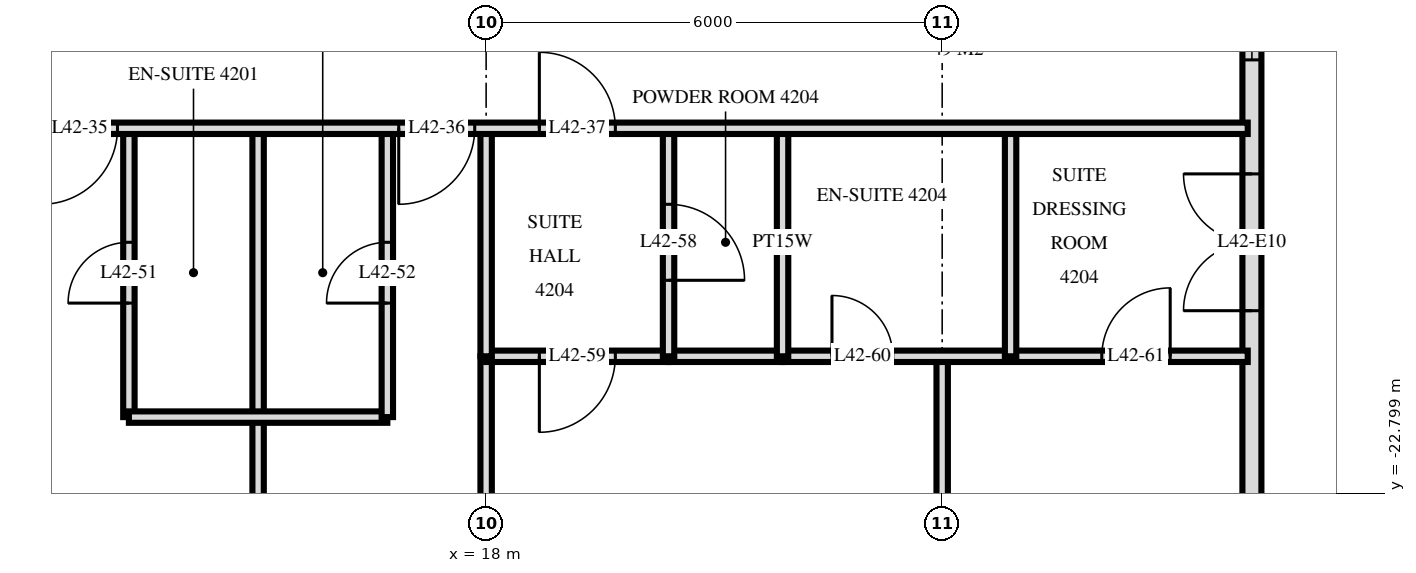
"""IFC4 building model, lengths in metres.
Left out: names, types, materials, properties, quantities, classifications, styles, units other than length and angle.
Written with IfcOpenShell. Run it as: python <this file> out.ifc"""

import sys

from ifc_helpers import new_model, si_unit, direction, frame, frame_2d, origin, place, context, subcontext, project, spatial, rectangle, extrude, element, fill, save


model = new_model("IFC4")
c1 = context("Model", 3, precision=1e-05, world=origin(), true_north=direction((0.0, 1.0)))
c2 = subcontext(c1, "Body", "Model", "MODEL_VIEW")
j1 = project(units=[si_unit("LENGTHUNIT", "METRE"), si_unit("PLANEANGLEUNIT", "RADIAN")], contexts=[c1])
p1 = place(None, origin())
s1 = spatial("IfcSite", under=j1, at=p1, CompositionType="ELEMENT")
p2 = place(p1, origin())
s2 = spatial("IfcBuilding", under=s1, at=p2, CompositionType="ELEMENT")
p3 = place(p2, frame((0.0, 0.0, 163.2)))
s3 = spatial("IfcBuildingStorey", under=s2, at=p3, CompositionType="ELEMENT", Elevation=163.2)
p4 = place(p3, frame((28.075, -29.275, 0.0), z_axis=(0.0, 0.0, 1.0), x_axis=(0.0, 1.0, 0.0)))
e1 = element("IfcWall", 1, at=p4, inside=s3, PredefinedType="SOLIDWALL", context=c2, shape_type="SweptSolid", body=[
    extrude(rectangle(XDim=25.951, YDim=0.25, at=frame_2d((12.975, 0.0))), origin(), (0.0, 0.0, 1.0), 3.32),
])
p5 = place(p4, frame((0.575, 0.0, 0.0)))
e2 = element("IfcOpeningElement", 2, at=p5, cuts=e1, PredefinedType="OPENING", context=c2, shape_type="SweptSolid", body=[
    extrude(rectangle(XDim=1.8, YDim=2.4, at=frame_2d((0.9, 1.2))), frame((0.0, 0.135, 0.0), z_axis=(0.0, -1.0, 0.0), x_axis=(1.0, 0.0, 0.0)), (0.0, 0.0, 1.0), 0.27),
])
p6 = place(p4, frame((3.325, 0.0, 0.3)))
e3 = element("IfcOpeningElement", 3, at=p6, cuts=e1, PredefinedType="OPENING", context=c2, shape_type="SweptSolid", body=[
    extrude(rectangle(XDim=1.8, YDim=2.1, at=frame_2d((0.9, 1.05))), frame((0.0, 0.135, 0.0), z_axis=(0.0, -1.0, 0.0), x_axis=(1.0, 0.0, 0.0)), (0.0, 0.0, 1.0), 0.27),
])
p7 = place(p4, frame((8.875, 0.0, 0.0)))
e4 = element("IfcOpeningElement", 4, at=p7, cuts=e1, PredefinedType="OPENING", context=c2, shape_type="SweptSolid", body=[
    extrude(rectangle(XDim=1.8, YDim=2.4, at=frame_2d((0.9, 1.2))), frame((0.0, 0.135, 0.0), z_axis=(0.0, -1.0, 0.0), x_axis=(1.0, 0.0, 0.0)), (0.0, 0.0, 1.0), 0.27),
])
p8 = place(p4, frame((12.175, 0.0, 0.3)))
e5 = element("IfcOpeningElement", 5, at=p8, cuts=e1, PredefinedType="OPENING", context=c2, shape_type="SweptSolid", body=[
    extrude(rectangle(XDim=1.2, YDim=2.1, at=frame_2d((0.6, 1.05))), frame((0.0, 0.135, 0.0), z_axis=(0.0, -1.0, 0.0), x_axis=(1.0, 0.0, 0.0)), (0.0, 0.0, 1.0), 0.27),
])
p9 = place(p4, frame((17.5, 0.0, 0.0)))
e6 = element("IfcOpeningElement", 6, at=p9, cuts=e1, PredefinedType="OPENING", context=c2, shape_type="SweptSolid", body=[
    extrude(rectangle(XDim=1.8, YDim=2.4, at=frame_2d((0.9, 1.2))), frame((0.0, 0.135, 0.0), z_axis=(0.0, -1.0, 0.0), x_axis=(1.0, 0.0, 0.0)), (0.0, 0.0, 1.0), 0.27),
])
p10 = place(p3, frame((24.9, -21.0, 0.0), z_axis=(0.0, 0.0, 1.0), x_axis=(0.0, 1.0, 0.0)))
e7 = element("IfcWall", 7, at=p10, inside=s3, PredefinedType="PARTITIONING", context=c2, shape_type="SweptSolid", body=[
    extrude(rectangle(XDim=3.0, YDim=0.15, at=frame_2d((1.5, 0.0))), origin(), (0.0, 0.0, 1.0), 3.32),
])
p11 = place(p3, frame((24.0, -33.557, 0.0), z_axis=(0.0, 0.0, 1.0), x_axis=(0.0, 1.0, 0.0)))
e8 = element("IfcWall", 8, at=p11, inside=s3, PredefinedType="PARTITIONING", context=c2, shape_type="SweptSolid", body=[
    extrude(rectangle(XDim=12.557, YDim=0.15, at=frame_2d((6.278, 0.0))), origin(), (0.0, 0.0, 1.0), 3.32),
])
p12 = place(p11, frame((5.737, 0.0, 0.0)))
e9 = element("IfcOpeningElement", 9, at=p12, cuts=e8, PredefinedType="OPENING", context=c2, shape_type="SweptSolid", body=[
    extrude(rectangle(XDim=0.9, YDim=2.1, at=frame_2d((0.45, 1.05))), frame((0.0, 0.085, 0.0), z_axis=(0.0, -1.0, 0.0), x_axis=(1.0, 0.0, 0.0)), (0.0, 0.0, 1.0), 0.17),
])
p13 = place(p3, frame((21.9, -21.0, 0.0), z_axis=(0.0, 0.0, 1.0), x_axis=(0.0, 1.0, 0.0)))
e10 = element("IfcWall", 10, at=p13, inside=s3, PredefinedType="PLUMBINGWALL", context=c2, shape_type="SweptSolid", body=[
    extrude(rectangle(XDim=3.0, YDim=0.15, at=frame_2d((1.5, 0.0))), origin(), (0.0, 0.0, 1.0), 3.32),
])
p14 = place(p3, frame((20.4, -21.0, 0.0), z_axis=(0.0, 0.0, 1.0), x_axis=(0.0, 1.0, 0.0)))
e11 = element("IfcWall", 11, at=p14, inside=s3, PredefinedType="PARTITIONING", context=c2, shape_type="SweptSolid", body=[
    extrude(rectangle(XDim=3.0, YDim=0.15, at=frame_2d((1.5, 0.0))), origin(), (0.0, 0.0, 1.0), 3.32),
])
p15 = place(p14, frame((1.0, 0.0, 0.0)))
e12 = element("IfcOpeningElement", 12, at=p15, cuts=e11, PredefinedType="OPENING", context=c2, shape_type="SweptSolid", body=[
    extrude(rectangle(XDim=1.0, YDim=2.1, at=frame_2d((0.5, 1.05))), frame((0.0, 0.085, 0.0), z_axis=(0.0, -1.0, 0.0), x_axis=(1.0, 0.0, 0.0)), (0.0, 0.0, 1.0), 0.17),
])
p16 = place(p3, frame((18.0, -21.0, 0.0), z_axis=(0.0, 0.0, 1.0), x_axis=(0.0, 1.0, 0.0)))
e13 = element("IfcWall", 13, at=p16, inside=s3, PredefinedType="PARTITIONING", context=c2, shape_type="SweptSolid", body=[
    extrude(rectangle(XDim=3.0, YDim=0.15, at=frame_2d((1.5, 0.0))), origin(), (0.0, 0.0, 1.0), 3.32),
])
p17 = place(p3, frame((18.0, -33.62, 0.0), z_axis=(0.0, 0.0, 1.0), x_axis=(0.0, 1.0, 0.0)))
e14 = element("IfcWall", 14, at=p17, inside=s3, PredefinedType="PARTITIONING", context=c2, shape_type="SweptSolid", body=[
    extrude(rectangle(XDim=12.62, YDim=0.15, at=frame_2d((6.31, 0.0))), origin(), (0.0, 0.0, 1.0), 3.32),
])
p18 = place(p3, frame((16.7, -21.8, 0.0), z_axis=(0.0, 0.0, 1.0), x_axis=(0.0, 1.0, 0.0)))
e15 = element("IfcWall", 15, at=p18, inside=s3, PredefinedType="PARTITIONING", context=c2, shape_type="SweptSolid", body=[
    extrude(rectangle(XDim=3.8, YDim=0.15, at=frame_2d((1.9, 0.0))), origin(), (0.0, 0.0, 1.0), 3.32),
])
p19 = place(p18, frame((1.5, 0.0, 0.0)))
e16 = element("IfcOpeningElement", 16, at=p19, cuts=e15, PredefinedType="OPENING", context=c2, shape_type="SweptSolid", body=[
    extrude(rectangle(XDim=0.8, YDim=2.1, at=frame_2d((0.4, 1.05))), frame((0.0, 0.085, 0.0), z_axis=(0.0, -1.0, 0.0), x_axis=(1.0, 0.0, 0.0)), (0.0, 0.0, 1.0), 0.17),
])
p20 = place(p3, frame((15.0, -33.62, 0.0), z_axis=(0.0, 0.0, 1.0), x_axis=(0.0, 1.0, 0.0)))
e17 = element("IfcWall", 17, at=p20, inside=s3, PredefinedType="PARTITIONING", context=c2, shape_type="SweptSolid", body=[
    extrude(rectangle(XDim=15.62, YDim=0.15, at=frame_2d((7.81, 0.0))), origin(), (0.0, 0.0, 1.0), 3.32),
])
p21 = place(p3, frame((13.3, -21.8, 0.0), z_axis=(0.0, 0.0, 1.0), x_axis=(0.0, 1.0, 0.0)))
e18 = element("IfcWall", 18, at=p21, inside=s3, PredefinedType="PARTITIONING", context=c2, shape_type="SweptSolid", body=[
    extrude(rectangle(XDim=3.8, YDim=0.15, at=frame_2d((1.9, 0.0))), origin(), (0.0, 0.0, 1.0), 3.32),
])
p22 = place(p21, frame((1.5, 0.0, 0.0)))
e19 = element("IfcOpeningElement", 19, at=p22, cuts=e18, PredefinedType="OPENING", context=c2, shape_type="SweptSolid", body=[
    extrude(rectangle(XDim=0.8, YDim=2.1, at=frame_2d((0.4, 1.05))), frame((0.0, 0.085, 0.0), z_axis=(0.0, -1.0, 0.0), x_axis=(1.0, 0.0, 0.0)), (0.0, 0.0, 1.0), 0.17),
])
p23 = place(p3, frame((13.3, -21.8, 0.0), z_axis=(0.0, 0.0, 1.0), x_axis=(1.0, 0.0, 0.0)))
e20 = element("IfcWall", 20, at=p23, inside=s3, PredefinedType="PARTITIONING", context=c2, shape_type="SweptSolid", body=[
    extrude(rectangle(XDim=3.4, YDim=0.15, at=frame_2d((1.7, 0.0))), origin(), (0.0, 0.0, 1.0), 3.32),
])
p24 = place(p3, frame((18.0, -21.0, 0.0), z_axis=(0.0, 0.0, 1.0), x_axis=(1.0, 0.0, 0.0)))
e21 = element("IfcWall", 21, at=p24, inside=s3, PredefinedType="PARTITIONING", context=c2, shape_type="SweptSolid", body=[
    extrude(rectangle(XDim=2.4, YDim=0.15, at=frame_2d((1.2, 0.0))), origin(), (0.0, 0.0, 1.0), 3.32),
])
p25 = place(p24, frame((0.7, 0.0, 0.0)))
e22 = element("IfcOpeningElement", 22, at=p25, cuts=e21, PredefinedType="OPENING", context=c2, shape_type="SweptSolid", body=[
    extrude(rectangle(XDim=1.0, YDim=2.1, at=frame_2d((0.5, 1.05))), frame((0.0, 0.085, 0.0), z_axis=(0.0, -1.0, 0.0), x_axis=(1.0, 0.0, 0.0)), (0.0, 0.0, 1.0), 0.17),
])
p26 = place(p3, frame((21.9, -21.0, 0.0), z_axis=(0.0, 0.0, 1.0), x_axis=(1.0, 0.0, 0.0)))
e23 = element("IfcWall", 23, at=p26, inside=s3, PredefinedType="PARTITIONING", context=c2, shape_type="SweptSolid", body=[
    extrude(rectangle(XDim=6.12, YDim=0.15, at=frame_2d((3.06, 0.0))), origin(), (0.0, 0.0, 1.0), 3.32),
])
p27 = place(p26, frame((0.65, 0.0, 0.0)))
e24 = element("IfcOpeningElement", 24, at=p27, cuts=e23, PredefinedType="OPENING", context=c2, shape_type="SweptSolid", body=[
    extrude(rectangle(XDim=0.8, YDim=2.1, at=frame_2d((0.4, 1.05))), frame((0.0, 0.085, 0.0), z_axis=(0.0, -1.0, 0.0), x_axis=(1.0, 0.0, 0.0)), (0.0, 0.0, 1.0), 0.17),
])
p28 = place(p26, frame((4.2, 0.0, 0.0)))
e25 = element("IfcOpeningElement", 25, at=p28, cuts=e23, PredefinedType="OPENING", context=c2, shape_type="SweptSolid", body=[
    extrude(rectangle(XDim=0.9, YDim=2.1, at=frame_2d((0.45, 1.05))), frame((0.0, 0.085, 0.0), z_axis=(0.0, -1.0, 0.0), x_axis=(1.0, 0.0, 0.0)), (0.0, 0.0, 1.0), 0.17),
])
p29 = place(p3, frame((20.4, -21.0, 0.0), z_axis=(0.0, 0.0, 1.0), x_axis=(1.0, 0.0, 0.0)))
e26 = element("IfcWall", 26, at=p29, inside=s3, PredefinedType="PLUMBINGWALL", context=c2, shape_type="SweptSolid", body=[
    extrude(rectangle(XDim=1.5, YDim=0.15, at=frame_2d((0.75, 0.0))), origin(), (0.0, 0.0, 1.0), 3.32),
])
p30 = place(p3, frame((-28.02, -18.0, 0.0), z_axis=(0.0, 0.0, 1.0), x_axis=(1.0, 0.0, 0.0)))
e27 = element("IfcWall", 27, at=p30, inside=s3, PredefinedType="PARTITIONING", context=c2, shape_type="SweptSolid", body=[
    extrude(rectangle(XDim=56.04, YDim=0.15, at=frame_2d((28.02, 0.0))), origin(), (0.0, 0.0, 1.0), 3.32),
])
p31 = place(p30, frame((14.32, 0.0, 0.0)))
e28 = element("IfcOpeningElement", 28, at=p31, cuts=e27, PredefinedType="OPENING", context=c2, shape_type="SweptSolid", body=[
    extrude(rectangle(XDim=1.0, YDim=2.1, at=frame_2d((0.5, 1.05))), frame((0.0, 0.085, 0.0), z_axis=(0.0, -1.0, 0.0), x_axis=(1.0, 0.0, 0.0)), (0.0, 0.0, 1.0), 0.17),
])
p32 = place(p30, frame((40.17, 0.0, 0.0)))
e29 = element("IfcOpeningElement", 29, at=p32, cuts=e27, PredefinedType="OPENING", context=c2, shape_type="SweptSolid", body=[
    extrude(rectangle(XDim=1.0, YDim=2.1, at=frame_2d((0.5, 1.05))), frame((0.0, 0.085, 0.0), z_axis=(0.0, -1.0, 0.0), x_axis=(1.0, 0.0, 0.0)), (0.0, 0.0, 1.0), 0.17),
])
p33 = place(p30, frame((44.87, 0.0, 0.0)))
e30 = element("IfcOpeningElement", 30, at=p33, cuts=e27, PredefinedType="OPENING", context=c2, shape_type="SweptSolid", body=[
    extrude(rectangle(XDim=1.0, YDim=2.1, at=frame_2d((0.5, 1.05))), frame((0.0, 0.085, 0.0), z_axis=(0.0, -1.0, 0.0), x_axis=(1.0, 0.0, 0.0)), (0.0, 0.0, 1.0), 0.17),
])
p34 = place(p30, frame((46.72, 0.0, 0.0)))
e31 = element("IfcOpeningElement", 31, at=p34, cuts=e27, PredefinedType="OPENING", context=c2, shape_type="SweptSolid", body=[
    extrude(rectangle(XDim=1.0, YDim=2.1, at=frame_2d((0.5, 1.05))), frame((0.0, 0.085, 0.0), z_axis=(0.0, -1.0, 0.0), x_axis=(1.0, 0.0, 0.0)), (0.0, 0.0, 1.0), 0.17),
])
p35 = place(p30, frame((18.52, 0.0, 0.0)))
e32 = element("IfcOpeningElement", 32, at=p35, cuts=e27, PredefinedType="OPENING", context=c2, shape_type="SweptSolid", body=[
    extrude(rectangle(XDim=1.0, YDim=2.1, at=frame_2d((0.5, 1.05))), frame((0.0, 0.085, 0.0), z_axis=(0.0, -1.0, 0.0), x_axis=(1.0, 0.0, 0.0)), (0.0, 0.0, 1.0), 0.17),
])
p36 = place(p30, frame((24.52, 0.0, 0.0)))
e33 = element("IfcOpeningElement", 33, at=p36, cuts=e27, PredefinedType="OPENING", context=c2, shape_type="SweptSolid", body=[
    extrude(rectangle(XDim=1.0, YDim=2.1, at=frame_2d((0.5, 1.05))), frame((0.0, 0.085, 0.0), z_axis=(0.0, -1.0, 0.0), x_axis=(1.0, 0.0, 0.0)), (0.0, 0.0, 1.0), 0.17),
])
p37 = place(p30, frame((30.52, 0.0, 0.0)))
e34 = element("IfcOpeningElement", 34, at=p37, cuts=e27, PredefinedType="OPENING", context=c2, shape_type="SweptSolid", body=[
    extrude(rectangle(XDim=1.0, YDim=2.1, at=frame_2d((0.5, 1.05))), frame((0.0, 0.085, 0.0), z_axis=(0.0, -1.0, 0.0), x_axis=(1.0, 0.0, 0.0)), (0.0, 0.0, 1.0), 0.17),
])
p38 = place(p30, frame((36.52, 0.0, 0.0)))
e35 = element("IfcOpeningElement", 35, at=p38, cuts=e27, PredefinedType="OPENING", context=c2, shape_type="SweptSolid", body=[
    extrude(rectangle(XDim=1.0, YDim=2.1, at=frame_2d((0.5, 1.05))), frame((0.0, 0.085, 0.0), z_axis=(0.0, -1.0, 0.0), x_axis=(1.0, 0.0, 0.0)), (0.0, 0.0, 1.0), 0.17),
])
p39 = place(p7, origin())
e36 = element("IfcDoor", 36, at=p39, inside=s3, OperationType="DOUBLE_DOOR_SINGLE_SWING", PredefinedType="DOOR", context=c2, shape_type="SweptSolid", body=[
    extrude(rectangle(XDim=1.8, YDim=2.4, at=frame_2d((0.9, 1.2))), frame((0.0, 0.025, 0.0), z_axis=(0.0, -1.0, 0.0), x_axis=(1.0, 0.0, 0.0)), (0.0, 0.0, 1.0), 0.05),
])
fill(e4, e36)
p40 = place(p8, origin())
e37 = element("IfcWindow", 37, at=p40, inside=s3, PartitioningType="SINGLE_PANEL", PredefinedType="WINDOW", context=c2, shape_type="SweptSolid", body=[
    extrude(rectangle(XDim=1.2, YDim=2.1, at=frame_2d((0.6, 1.05))), frame((0.0, 0.03, 0.0), z_axis=(0.0, -1.0, 0.0), x_axis=(1.0, 0.0, 0.0)), (0.0, 0.0, 1.0), 0.06),
])
fill(e5, e37)
p41 = place(p32, frame((0.5, 0.0, 0.0), z_axis=(0.0, 0.0, 1.0), x_axis=(-1.0, 0.0, 0.0)))
e38 = element("IfcDoor", 38, at=p41, inside=s3, OperationType="SINGLE_SWING_LEFT", PredefinedType="DOOR", context=c2, shape_type="SweptSolid", body=[
    extrude(rectangle(XDim=1.0, YDim=2.1, at=frame_2d((0.0, 1.05))), frame((0.0, -0.025, 0.0), z_axis=(0.0, 1.0, 0.0), x_axis=(-1.0, 0.0, 0.0)), (0.0, 0.0, 1.0), 0.05),
])
fill(e29, e38)
p42 = place(p33, frame((0.5, 0.0, 0.0), z_axis=(0.0, 0.0, 1.0), x_axis=(-1.0, 0.0, 0.0)))
e39 = element("IfcDoor", 39, at=p42, inside=s3, OperationType="SINGLE_SWING_LEFT", PredefinedType="DOOR", context=c2, shape_type="SweptSolid", body=[
    extrude(rectangle(XDim=1.0, YDim=2.1, at=frame_2d((0.0, 1.05))), frame((0.0, -0.025, 0.0), z_axis=(0.0, 1.0, 0.0), x_axis=(-1.0, 0.0, 0.0)), (0.0, 0.0, 1.0), 0.05),
])
fill(e30, e39)
p43 = place(p34, origin())
e40 = element("IfcDoor", 40, at=p43, inside=s3, OperationType="SINGLE_SWING_RIGHT", PredefinedType="DOOR", context=c2, shape_type="SweptSolid", body=[
    extrude(rectangle(XDim=1.0, YDim=2.1, at=frame_2d((0.5, 1.05))), frame((0.0, 0.025, 0.0), z_axis=(0.0, -1.0, 0.0), x_axis=(1.0, 0.0, 0.0)), (0.0, 0.0, 1.0), 0.05),
])
fill(e31, e40)
p44 = place(p22, origin())
e41 = element("IfcDoor", 41, at=p44, inside=s3, OperationType="SINGLE_SWING_RIGHT", PredefinedType="DOOR", context=c2, shape_type="SweptSolid", body=[
    extrude(rectangle(XDim=0.8, YDim=2.1, at=frame_2d((0.4, 1.05))), frame((0.0, 0.025, 0.0), z_axis=(0.0, -1.0, 0.0), x_axis=(1.0, 0.0, 0.0)), (0.0, 0.0, 1.0), 0.05),
])
fill(e19, e41)
p45 = place(p19, origin())
e42 = element("IfcDoor", 42, at=p45, inside=s3, OperationType="SINGLE_SWING_RIGHT", PredefinedType="DOOR", context=c2, shape_type="SweptSolid", body=[
    extrude(rectangle(XDim=0.8, YDim=2.1, at=frame_2d((0.4, 1.05))), frame((0.0, 0.025, 0.0), z_axis=(0.0, -1.0, 0.0), x_axis=(1.0, 0.0, 0.0)), (0.0, 0.0, 1.0), 0.05),
])
fill(e16, e42)
p46 = place(p15, frame((0.5, 0.0, 0.0), z_axis=(0.0, 0.0, 1.0), x_axis=(-1.0, 0.0, 0.0)))
e43 = element("IfcDoor", 43, at=p46, inside=s3, OperationType="SINGLE_SWING_LEFT", PredefinedType="DOOR", context=c2, shape_type="SweptSolid", body=[
    extrude(rectangle(XDim=1.0, YDim=2.1, at=frame_2d((0.0, 1.05))), frame((0.0, -0.025, 0.0), z_axis=(0.0, 1.0, 0.0), x_axis=(-1.0, 0.0, 0.0)), (0.0, 0.0, 1.0), 0.05),
])
fill(e12, e43)
p47 = place(p25, frame((0.5, 0.0, 0.0), z_axis=(0.0, 0.0, 1.0), x_axis=(-1.0, 0.0, 0.0)))
e44 = element("IfcDoor", 44, at=p47, inside=s3, OperationType="SINGLE_SWING_LEFT", PredefinedType="DOOR", context=c2, shape_type="SweptSolid", body=[
    extrude(rectangle(XDim=1.0, YDim=2.1, at=frame_2d((0.0, 1.05))), frame((0.0, -0.025, 0.0), z_axis=(0.0, 1.0, 0.0), x_axis=(-1.0, 0.0, 0.0)), (0.0, 0.0, 1.0), 0.05),
])
fill(e22, e44)
p48 = place(p27, origin())
e45 = element("IfcDoor", 45, at=p48, inside=s3, OperationType="SINGLE_SWING_RIGHT", PredefinedType="DOOR", context=c2, shape_type="SweptSolid", body=[
    extrude(rectangle(XDim=0.8, YDim=2.1, at=frame_2d((0.4, 1.05))), frame((0.0, 0.025, 0.0), z_axis=(0.0, -1.0, 0.0), x_axis=(1.0, 0.0, 0.0)), (0.0, 0.0, 1.0), 0.05),
])
fill(e24, e45)
p49 = place(p28, origin())
e46 = element("IfcDoor", 46, at=p49, inside=s3, OperationType="SINGLE_SWING_LEFT", PredefinedType="DOOR", context=c2, shape_type="SweptSolid", body=[
    extrude(rectangle(XDim=0.9, YDim=2.1, at=frame_2d((0.45, 1.05))), frame((0.0, 0.025, 0.0), z_axis=(0.0, -1.0, 0.0), x_axis=(1.0, 0.0, 0.0)), (0.0, 0.0, 1.0), 0.05),
])
fill(e25, e46)
save(model, sys.argv[1])
